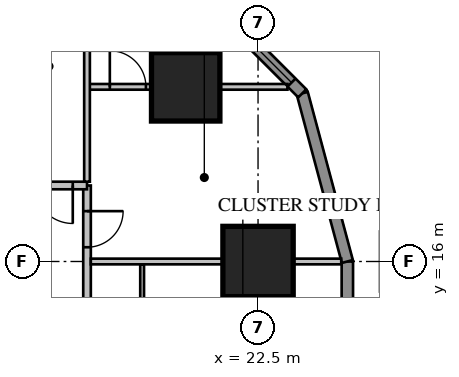
"""IFC4 building model, lengths in metres.
Left out: names, types, materials, properties, quantities, classifications, styles, units other than length and angle.
Written with IfcOpenShell. Run it as: python <this file> out.ifc"""

import sys

from ifc_helpers import new_model, si_unit, direction, frame, frame_2d, origin, origin_2d, place, context, subcontext, project, spatial, rectangle, extrude, element, fill, save


model = new_model("IFC4")
c1 = context("Model", 3, precision=1e-05, world=origin(), true_north=direction((0.0, 1.0)))
c2 = subcontext(c1, "Body", "Model", "MODEL_VIEW")
j1 = project(units=[si_unit("LENGTHUNIT", "METRE"), si_unit("PLANEANGLEUNIT", "RADIAN")], contexts=[c1])
p1 = place(None, origin())
s1 = spatial("IfcSite", under=j1, at=p1, CompositionType="ELEMENT")
p2 = place(p1, origin())
s2 = spatial("IfcBuilding", under=s1, at=p2, CompositionType="ELEMENT")
p3 = place(p2, frame((0.0, 0.0, 19.85)))
s3 = spatial("IfcBuildingStorey", under=s2, at=p3, CompositionType="ELEMENT", Elevation=19.85)
p4 = place(p3, frame((22.5, 16.0, 0.0), z_axis=(0.0, 0.0, 1.0), x_axis=(1.0, 0.0, 0.0)))
e1 = element("IfcColumn", 1, at=p4, inside=s3, PredefinedType="COLUMN", context=c2, shape_type="SweptSolid", body=[
    extrude(rectangle(XDim=1.85, YDim=1.85, at=origin_2d()), origin(), (0.0, 0.0, 1.0), 3.85),
])
p5 = place(p3, frame((20.596, 20.596, 0.0), z_axis=(0.0, 0.0, 1.0), x_axis=(1.0, 0.0, 0.0)))
e2 = element("IfcColumn", 2, at=p5, inside=s3, PredefinedType="COLUMN", context=c2, shape_type="SweptSolid", body=[
    extrude(rectangle(XDim=1.8, YDim=1.8, at=origin_2d()), origin(), (0.0, 0.0, 1.0), 3.85),
])
p6 = place(p3, frame((24.85, -16.0, 0.0), z_axis=(0.0, 0.0, 1.0), x_axis=(0.0, 1.0, 0.0)))
e3 = element("IfcWall", 3, at=p6, inside=s3, PredefinedType="SOLIDWALL", context=c2, shape_type="SweptSolid", body=[
    extrude(rectangle(XDim=32.0, YDim=0.3, at=frame_2d((16.0, 0.0))), origin(), (0.0, 0.0, 1.0), 3.65),
])
p7 = place(p6, frame((1.2, 0.0, 0.75)))
e4 = element("IfcOpeningElement", 4, at=p7, cuts=e3, PredefinedType="OPENING", context=c2, shape_type="SweptSolid", body=[
    extrude(rectangle(XDim=1.6, YDim=1.8, at=frame_2d((0.8, 0.9))), frame((0.0, 0.17, 0.0), z_axis=(0.0, -1.0, 0.0), x_axis=(1.0, 0.0, 0.0)), (0.0, 0.0, 1.0), 0.34),
])
p8 = place(p6, frame((5.2, 0.0, 0.75)))
e5 = element("IfcOpeningElement", 5, at=p8, cuts=e3, PredefinedType="OPENING", context=c2, shape_type="SweptSolid", body=[
    extrude(rectangle(XDim=1.6, YDim=1.8, at=frame_2d((0.8, 0.9))), frame((0.0, 0.17, 0.0), z_axis=(0.0, -1.0, 0.0), x_axis=(1.0, 0.0, 0.0)), (0.0, 0.0, 1.0), 0.34),
])
p9 = place(p6, frame((17.2, 0.0, 0.75)))
e6 = element("IfcOpeningElement", 6, at=p9, cuts=e3, PredefinedType="OPENING", context=c2, shape_type="SweptSolid", body=[
    extrude(rectangle(XDim=1.6, YDim=1.8, at=frame_2d((0.8, 0.9))), frame((0.0, 0.17, 0.0), z_axis=(0.0, -1.0, 0.0), x_axis=(1.0, 0.0, 0.0)), (0.0, 0.0, 1.0), 0.34),
])
p10 = place(p6, frame((21.2, 0.0, 0.75)))
e7 = element("IfcOpeningElement", 7, at=p10, cuts=e3, PredefinedType="OPENING", context=c2, shape_type="SweptSolid", body=[
    extrude(rectangle(XDim=1.6, YDim=1.8, at=frame_2d((0.8, 0.9))), frame((0.0, 0.17, 0.0), z_axis=(0.0, -1.0, 0.0), x_axis=(1.0, 0.0, 0.0)), (0.0, 0.0, 1.0), 0.34),
])
p11 = place(p6, frame((25.2, 0.0, 0.75)))
e8 = element("IfcOpeningElement", 8, at=p11, cuts=e3, PredefinedType="OPENING", context=c2, shape_type="SweptSolid", body=[
    extrude(rectangle(XDim=1.6, YDim=1.8, at=frame_2d((0.8, 0.9))), frame((0.0, 0.17, 0.0), z_axis=(0.0, -1.0, 0.0), x_axis=(1.0, 0.0, 0.0)), (0.0, 0.0, 1.0), 0.34),
])
p12 = place(p6, frame((29.2, 0.0, 0.75)))
e9 = element("IfcOpeningElement", 9, at=p12, cuts=e3, PredefinedType="OPENING", context=c2, shape_type="SweptSolid", body=[
    extrude(rectangle(XDim=1.6, YDim=1.8, at=frame_2d((0.8, 0.9))), frame((0.0, 0.17, 0.0), z_axis=(0.0, -1.0, 0.0), x_axis=(1.0, 0.0, 0.0)), (0.0, 0.0, 1.0), 0.34),
])
p13 = place(p6, frame((8.8, 0.0, 0.75)))
e10 = element("IfcOpeningElement", 10, at=p13, cuts=e3, PredefinedType="OPENING", context=c2, shape_type="SweptSolid", body=[
    extrude(rectangle(XDim=2.4, YDim=1.8, at=frame_2d((1.2, 0.9))), frame((0.0, 0.17, 0.0), z_axis=(0.0, -1.0, 0.0), x_axis=(1.0, 0.0, 0.0)), (0.0, 0.0, 1.0), 0.34),
])
p14 = place(p6, frame((13.812, 0.0, 0.0)))
e11 = element("IfcOpeningElement", 11, at=p14, cuts=e3, PredefinedType="OPENING", context=c2, shape_type="SweptSolid", body=[
    extrude(rectangle(XDim=1.0, YDim=2.4, at=frame_2d((0.5, 1.2))), frame((0.0, 0.17, 0.0), z_axis=(0.0, -1.0, 0.0), x_axis=(1.0, 0.0, 0.0)), (0.0, 0.0, 1.0), 0.34),
])
p15 = place(p3, frame((24.85, 16.0, 0.0), z_axis=(0.0, 0.0, 1.0), x_axis=(-0.258839972501, 0.965920218567, 0.0)))
e12 = element("IfcWall", 12, at=p15, inside=s3, PredefinedType="SOLIDWALL", context=c2, shape_type="SweptSolid", body=[
    extrude(rectangle(XDim=4.581, YDim=0.3, at=frame_2d((2.291, 0.0))), origin(), (0.0, 0.0, 1.0), 3.65),
])
p16 = place(p3, frame((23.664, 20.425, 0.0), z_axis=(0.0, 0.0, 1.0), x_axis=(-0.707106781187, 0.707106781187, 0.0)))
e13 = element("IfcWall", 13, at=p16, inside=s3, PredefinedType="SOLIDWALL", context=c2, shape_type="SweptSolid", body=[
    extrude(rectangle(XDim=4.581, YDim=0.3, at=frame_2d((2.291, 0.0))), origin(), (0.0, 0.0, 1.0), 3.65),
])
p17 = place(p16, frame((0.4, 0.0, 0.75)))
e14 = element("IfcOpeningElement", 14, at=p17, cuts=e13, PredefinedType="OPENING", context=c2, shape_type="SweptSolid", body=[
    extrude(rectangle(XDim=3.781, YDim=1.8, at=frame_2d((1.891, 0.9))), frame((0.0, 0.17, 0.0), z_axis=(0.0, -1.0, 0.0), x_axis=(1.0, 0.0, 0.0)), (0.0, 0.0, 1.0), 0.34),
])
p18 = place(p3, frame((18.0, -18.0, 0.0), z_axis=(0.0, 0.0, 1.0), x_axis=(0.0, 1.0, 0.0)))
e15 = element("IfcWall", 15, at=p18, inside=s3, PredefinedType="PARTITIONING", context=c2, shape_type="SweptSolid", body=[
    extrude(rectangle(XDim=36.0, YDim=0.2, at=frame_2d((18.0, 0.0))), origin(), (0.0, 0.0, 1.0), 3.65),
])
p19 = place(p18, frame((10.4, 0.0, 0.0)))
e16 = element("IfcOpeningElement", 16, at=p19, cuts=e15, PredefinedType="OPENING", context=c2, shape_type="SweptSolid", body=[
    extrude(rectangle(XDim=1.0, YDim=2.1, at=frame_2d((0.5, 1.05))), frame((0.0, 0.12, 0.0), z_axis=(0.0, -1.0, 0.0), x_axis=(1.0, 0.0, 0.0)), (0.0, 0.0, 1.0), 0.24),
])
p20 = place(p18, frame((0.375, 0.0, 0.0)))
e17 = element("IfcOpeningElement", 17, at=p20, cuts=e15, PredefinedType="OPENING", context=c2, shape_type="SweptSolid", body=[
    extrude(rectangle(XDim=1.0, YDim=2.1, at=frame_2d((0.5, 1.05))), frame((0.0, 0.12, 0.0), z_axis=(0.0, -1.0, 0.0), x_axis=(1.0, 0.0, 0.0)), (0.0, 0.0, 1.0), 0.24),
])
p21 = place(p18, frame((34.375, 0.0, 0.0)))
e18 = element("IfcOpeningElement", 18, at=p21, cuts=e15, PredefinedType="OPENING", context=c2, shape_type="SweptSolid", body=[
    extrude(rectangle(XDim=0.95, YDim=2.1, at=frame_2d((0.475, 1.05))), frame((0.0, 0.12, 0.0), z_axis=(0.0, -1.0, 0.0), x_axis=(1.0, 0.0, 0.0)), (0.0, 0.0, 1.0), 0.24),
])
p22 = place(p3, frame((19.45, -15.925, 0.0), z_axis=(0.0, 0.0, 1.0), x_axis=(0.0, 1.0, 0.0)))
e19 = element("IfcWall", 19, at=p22, inside=s3, PredefinedType="PARTITIONING", context=c2, shape_type="SweptSolid", body=[
    extrude(rectangle(XDim=31.85, YDim=0.1, at=frame_2d((15.925, 0.0))), origin(), (0.0, 0.0, 1.0), 3.65),
])
p23 = place(p22, frame((10.125, 0.0, 0.0)))
e20 = element("IfcOpeningElement", 20, at=p23, cuts=e19, PredefinedType="OPENING", context=c2, shape_type="SweptSolid", body=[
    extrude(rectangle(XDim=1.0, YDim=2.1, at=frame_2d((0.5, 1.05))), frame((0.0, 0.07, 0.0), z_axis=(0.0, -1.0, 0.0), x_axis=(1.0, 0.0, 0.0)), (0.0, 0.0, 1.0), 0.14),
])
p24 = place(p22, frame((8.3, 0.0, 0.0)))
e21 = element("IfcOpeningElement", 21, at=p24, cuts=e19, PredefinedType="OPENING", context=c2, shape_type="SweptSolid", body=[
    extrude(rectangle(XDim=0.8, YDim=2.1, at=frame_2d((0.4, 1.05))), frame((0.0, 0.07, 0.0), z_axis=(0.0, -1.0, 0.0), x_axis=(1.0, 0.0, 0.0)), (0.0, 0.0, 1.0), 0.14),
])
p25 = place(p22, frame((1.725, 0.0, 0.0)))
e22 = element("IfcOpeningElement", 22, at=p25, cuts=e19, PredefinedType="OPENING", context=c2, shape_type="SweptSolid", body=[
    extrude(rectangle(XDim=0.95, YDim=2.1, at=frame_2d((0.475, 1.05))), frame((0.0, 0.07, 0.0), z_axis=(0.0, -1.0, 0.0), x_axis=(1.0, 0.0, 0.0)), (0.0, 0.0, 1.0), 0.14),
])
p26 = place(p22, frame((5.725, 0.0, 0.0)))
e23 = element("IfcOpeningElement", 23, at=p26, cuts=e19, PredefinedType="OPENING", context=c2, shape_type="SweptSolid", body=[
    extrude(rectangle(XDim=0.95, YDim=2.1, at=frame_2d((0.475, 1.05))), frame((0.0, 0.07, 0.0), z_axis=(0.0, -1.0, 0.0), x_axis=(1.0, 0.0, 0.0)), (0.0, 0.0, 1.0), 0.14),
])
p27 = place(p22, frame((17.725, 0.0, 0.0)))
e24 = element("IfcOpeningElement", 24, at=p27, cuts=e19, PredefinedType="OPENING", context=c2, shape_type="SweptSolid", body=[
    extrude(rectangle(XDim=0.95, YDim=2.1, at=frame_2d((0.475, 1.05))), frame((0.0, 0.07, 0.0), z_axis=(0.0, -1.0, 0.0), x_axis=(1.0, 0.0, 0.0)), (0.0, 0.0, 1.0), 0.14),
])
p28 = place(p22, frame((21.725, 0.0, 0.0)))
e25 = element("IfcOpeningElement", 25, at=p28, cuts=e19, PredefinedType="OPENING", context=c2, shape_type="SweptSolid", body=[
    extrude(rectangle(XDim=0.95, YDim=2.1, at=frame_2d((0.475, 1.05))), frame((0.0, 0.07, 0.0), z_axis=(0.0, -1.0, 0.0), x_axis=(1.0, 0.0, 0.0)), (0.0, 0.0, 1.0), 0.14),
])
p29 = place(p22, frame((25.725, 0.0, 0.0)))
e26 = element("IfcOpeningElement", 26, at=p29, cuts=e19, PredefinedType="OPENING", context=c2, shape_type="SweptSolid", body=[
    extrude(rectangle(XDim=0.95, YDim=2.1, at=frame_2d((0.475, 1.05))), frame((0.0, 0.07, 0.0), z_axis=(0.0, -1.0, 0.0), x_axis=(1.0, 0.0, 0.0)), (0.0, 0.0, 1.0), 0.14),
])
p30 = place(p22, frame((29.725, 0.0, 0.0)))
e27 = element("IfcOpeningElement", 27, at=p30, cuts=e19, PredefinedType="OPENING", context=c2, shape_type="SweptSolid", body=[
    extrude(rectangle(XDim=0.95, YDim=2.1, at=frame_2d((0.475, 1.05))), frame((0.0, 0.07, 0.0), z_axis=(0.0, -1.0, 0.0), x_axis=(1.0, 0.0, 0.0)), (0.0, 0.0, 1.0), 0.14),
])
p31 = place(p3, frame((18.1, 16.0, 0.0), z_axis=(0.0, 0.0, 1.0), x_axis=(1.0, 0.0, 0.0)))
e28 = element("IfcWall", 28, at=p31, inside=s3, PredefinedType="PARTITIONING", context=c2, shape_type="SweptSolid", body=[
    extrude(rectangle(XDim=6.589, YDim=0.15, at=frame_2d((3.295, 0.0))), origin(), (0.0, 0.0, 1.0), 3.65),
])
p32 = place(p3, frame((18.065, 20.596, 0.0), z_axis=(0.0, 0.0, 1.0), x_axis=(1.0, 0.0, 0.0)))
e29 = element("IfcWall", 29, at=p32, inside=s3, PredefinedType="PARTITIONING", context=c2, shape_type="SweptSolid", body=[
    extrude(rectangle(XDim=5.209, YDim=0.15, at=frame_2d((2.604, 0.0))), origin(), (0.0, 0.0, 1.0), 3.65),
])
p33 = place(p32, frame((0.535, 0.0, 0.0)))
e30 = element("IfcOpeningElement", 30, at=p33, cuts=e29, PredefinedType="OPENING", context=c2, shape_type="SweptSolid", body=[
    extrude(rectangle(XDim=0.95, YDim=2.1, at=frame_2d((0.475, 1.05))), frame((0.0, 0.095, 0.0), z_axis=(0.0, -1.0, 0.0), x_axis=(1.0, 0.0, 0.0)), (0.0, 0.0, 1.0), 0.19),
])
p34 = place(p3, frame((18.0, 18.0, 0.0), z_axis=(0.0, 0.0, 1.0), x_axis=(-1.0, 0.0, 0.0)))
e31 = element("IfcWall", 31, at=p34, inside=s3, PredefinedType="PARTITIONING", context=c2, shape_type="SweptSolid", body=[
    extrude(rectangle(XDim=36.0, YDim=0.2, at=frame_2d((18.0, 0.0))), origin(), (0.0, 0.0, 1.0), 3.65),
])
p35 = place(p34, frame((0.375, 0.0, 0.0)))
e32 = element("IfcOpeningElement", 32, at=p35, cuts=e31, PredefinedType="OPENING", context=c2, shape_type="SweptSolid", body=[
    extrude(rectangle(XDim=1.0, YDim=2.1, at=frame_2d((0.5, 1.05))), frame((0.0, 0.12, 0.0), z_axis=(0.0, -1.0, 0.0), x_axis=(1.0, 0.0, 0.0)), (0.0, 0.0, 1.0), 0.24),
])
p36 = place(p34, frame((3.8, 0.0, 0.0)))
e33 = element("IfcOpeningElement", 33, at=p36, cuts=e31, PredefinedType="OPENING", context=c2, shape_type="SweptSolid", body=[
    extrude(rectangle(XDim=0.95, YDim=2.1, at=frame_2d((0.475, 1.05))), frame((0.0, 0.12, 0.0), z_axis=(0.0, -1.0, 0.0), x_axis=(1.0, 0.0, 0.0)), (0.0, 0.0, 1.0), 0.24),
])
p37 = place(p34, frame((7.8, 0.0, 0.0)))
e34 = element("IfcOpeningElement", 34, at=p37, cuts=e31, PredefinedType="OPENING", context=c2, shape_type="SweptSolid", body=[
    extrude(rectangle(XDim=0.95, YDim=2.1, at=frame_2d((0.475, 1.05))), frame((0.0, 0.12, 0.0), z_axis=(0.0, -1.0, 0.0), x_axis=(1.0, 0.0, 0.0)), (0.0, 0.0, 1.0), 0.24),
])
p38 = place(p34, frame((19.8, 0.0, 0.0)))
e35 = element("IfcOpeningElement", 35, at=p38, cuts=e31, PredefinedType="OPENING", context=c2, shape_type="SweptSolid", body=[
    extrude(rectangle(XDim=0.95, YDim=2.1, at=frame_2d((0.475, 1.05))), frame((0.0, 0.12, 0.0), z_axis=(0.0, -1.0, 0.0), x_axis=(1.0, 0.0, 0.0)), (0.0, 0.0, 1.0), 0.24),
])
p39 = place(p34, frame((23.8, 0.0, 0.0)))
e36 = element("IfcOpeningElement", 36, at=p39, cuts=e31, PredefinedType="OPENING", context=c2, shape_type="SweptSolid", body=[
    extrude(rectangle(XDim=0.95, YDim=2.1, at=frame_2d((0.475, 1.05))), frame((0.0, 0.12, 0.0), z_axis=(0.0, -1.0, 0.0), x_axis=(1.0, 0.0, 0.0)), (0.0, 0.0, 1.0), 0.24),
])
p40 = place(p34, frame((27.8, 0.0, 0.0)))
e37 = element("IfcOpeningElement", 37, at=p40, cuts=e31, PredefinedType="OPENING", context=c2, shape_type="SweptSolid", body=[
    extrude(rectangle(XDim=0.95, YDim=2.1, at=frame_2d((0.475, 1.05))), frame((0.0, 0.12, 0.0), z_axis=(0.0, -1.0, 0.0), x_axis=(1.0, 0.0, 0.0)), (0.0, 0.0, 1.0), 0.24),
])
p41 = place(p34, frame((31.8, 0.0, 0.0)))
e38 = element("IfcOpeningElement", 38, at=p41, cuts=e31, PredefinedType="OPENING", context=c2, shape_type="SweptSolid", body=[
    extrude(rectangle(XDim=0.95, YDim=2.1, at=frame_2d((0.475, 1.05))), frame((0.0, 0.12, 0.0), z_axis=(0.0, -1.0, 0.0), x_axis=(1.0, 0.0, 0.0)), (0.0, 0.0, 1.0), 0.24),
])
p42 = place(p34, frame((34.375, 0.0, 0.0)))
e39 = element("IfcOpeningElement", 39, at=p42, cuts=e31, PredefinedType="OPENING", context=c2, shape_type="SweptSolid", body=[
    extrude(rectangle(XDim=0.95, YDim=2.1, at=frame_2d((0.475, 1.05))), frame((0.0, 0.12, 0.0), z_axis=(0.0, -1.0, 0.0), x_axis=(1.0, 0.0, 0.0)), (0.0, 0.0, 1.0), 0.24),
])
p43 = place(p34, frame((11.2, 0.0, 0.0)))
e40 = element("IfcOpeningElement", 40, at=p43, cuts=e31, PredefinedType="OPENING", context=c2, shape_type="SweptSolid", body=[
    extrude(rectangle(XDim=1.0, YDim=2.1, at=frame_2d((0.5, 1.05))), frame((0.0, 0.12, 0.0), z_axis=(0.0, -1.0, 0.0), x_axis=(1.0, 0.0, 0.0)), (0.0, 0.0, 1.0), 0.24),
])
p44 = place(p3, frame((18.0, 18.1, 0.0), z_axis=(0.0, 0.0, 1.0), x_axis=(0.0, 1.0, 0.0)))
e41 = element("IfcWall", 41, at=p44, inside=s3, PredefinedType="PARTITIONING", context=c2, shape_type="SweptSolid", body=[
    extrude(rectangle(XDim=6.053, YDim=0.15, at=frame_2d((3.027, 0.0))), origin(), (0.0, 0.0, 1.0), 3.65),
])
p45 = place(p17, origin())
e42 = element("IfcWindow", 42, at=p45, inside=s3, PartitioningType="SINGLE_PANEL", PredefinedType="WINDOW", context=c2, shape_type="SweptSolid", body=[
    extrude(rectangle(XDim=3.781, YDim=1.8, at=frame_2d((1.891, 0.9))), frame((0.0, 0.03, 0.0), z_axis=(0.0, -1.0, 0.0), x_axis=(1.0, 0.0, 0.0)), (0.0, 0.0, 1.0), 0.06),
])
fill(e14, e42)
p46 = place(p21, origin())
e43 = element("IfcDoor", 43, at=p46, inside=s3, OperationType="SINGLE_SWING_RIGHT", PredefinedType="DOOR", context=c2, shape_type="SweptSolid", body=[
    extrude(rectangle(XDim=0.95, YDim=2.1, at=frame_2d((0.475, 1.05))), frame((0.0, 0.025, 0.0), z_axis=(0.0, -1.0, 0.0), x_axis=(1.0, 0.0, 0.0)), (0.0, 0.0, 1.0), 0.05),
])
fill(e18, e43)
p47 = place(p33, origin())
e44 = element("IfcDoor", 44, at=p47, inside=s3, OperationType="SINGLE_SWING_LEFT", PredefinedType="DOOR", context=c2, shape_type="SweptSolid", body=[
    extrude(rectangle(XDim=0.95, YDim=2.1, at=frame_2d((0.475, 1.05))), frame((0.0, 0.025, 0.0), z_axis=(0.0, -1.0, 0.0), x_axis=(1.0, 0.0, 0.0)), (0.0, 0.0, 1.0), 0.05),
])
fill(e30, e44)
p48 = place(p35, origin())
e45 = element("IfcDoor", 45, at=p48, inside=s3, OperationType="SINGLE_SWING_LEFT", PredefinedType="DOOR", context=c2, shape_type="SweptSolid", body=[
    extrude(rectangle(XDim=1.0, YDim=2.1, at=frame_2d((0.5, 1.05))), frame((0.0, 0.025, 0.0), z_axis=(0.0, -1.0, 0.0), x_axis=(1.0, 0.0, 0.0)), (0.0, 0.0, 1.0), 0.05),
])
fill(e32, e45)
save(model, sys.argv[1])
